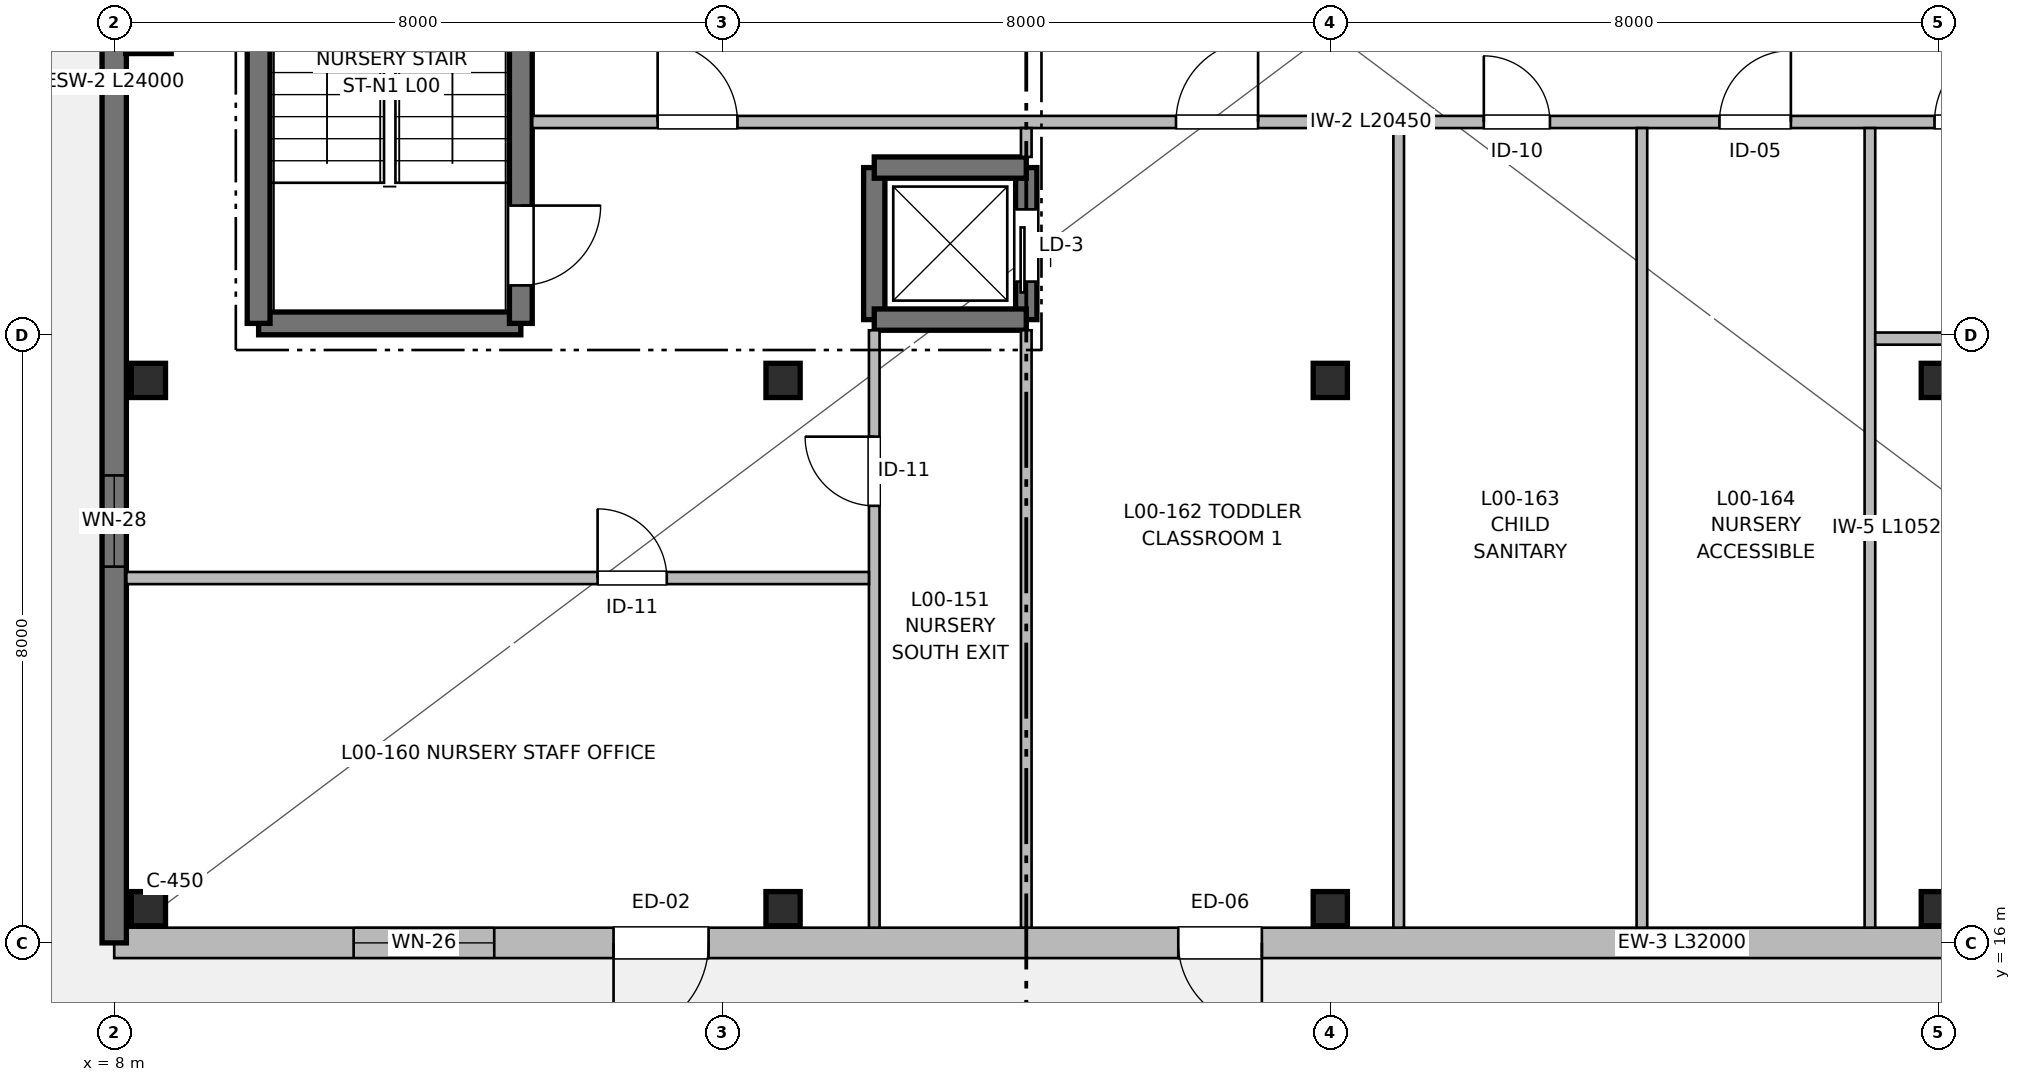
"""IFC4 building model, lengths in metres.
Left out: names, types, materials, properties, quantities, classifications, styles, units other than length and angle.
Written with IfcOpenShell. Run it as: python <this file> out.ifc"""

import sys

from ifc_helpers import new_model, si_unit, direction, frame, frame_2d, origin, origin_2d, place, context, subcontext, project, spatial, rectangle, extrude, element, fill, save


model = new_model("IFC4")
c1 = context("Model", 3, precision=1e-05, world=origin(), true_north=direction((0.0, 1.0)))
c2 = subcontext(c1, "Body", "Model", "MODEL_VIEW")
j1 = project(units=[si_unit("LENGTHUNIT", "METRE"), si_unit("PLANEANGLEUNIT", "RADIAN")], contexts=[c1])
p1 = place(None, origin())
s1 = spatial("IfcSite", under=j1, at=p1, CompositionType="ELEMENT")
p2 = place(p1, origin())
s2 = spatial("IfcBuilding", under=s1, at=p2, CompositionType="ELEMENT")
p3 = place(p2, origin())
s3 = spatial("IfcBuildingStorey", under=s2, at=p3, CompositionType="ELEMENT", Elevation=0.0)
for number, where, z_axis, x_axis in (
    (1, (8.45, 16.45, 0.0), (0.0, 0.0, 1.0), (1.0, 0.0, 0.0)),
    (2, (8.45, 23.4, 0.0), (0.0, 0.0, 1.0), (1.0, 0.0, 0.0)),
):
    element("IfcColumn", number, at=place(p3, frame(where, z_axis=z_axis, x_axis=x_axis)), inside=s3, PredefinedType="COLUMN", context=c2, shape_type="SweptSolid", body=[
        extrude(rectangle(XDim=0.45, YDim=0.45, at=origin_2d()), origin(), (0.0, 0.0, 1.0), 4.16),
    ])
p4 = place(p3, frame((8.45, 28.0, 0.0), z_axis=(0.0, 0.0, 1.0), x_axis=(1.0, 0.0, 0.0)))
e3 = element("IfcColumn", 3, at=p4, inside=s3, PredefinedType="COLUMN", context=c2, shape_type="SweptSolid", body=[
    extrude(rectangle(XDim=0.6, YDim=0.6, at=origin_2d()), origin(), (0.0, 0.0, 1.0), 4.16),
])
for number, where, z_axis, x_axis in (
    (4, (16.8, 16.45, 0.0), (0.0, 0.0, 1.0), (1.0, 0.0, 0.0)),
    (5, (16.8, 23.4, 0.0), (0.0, 0.0, 1.0), (1.0, 0.0, 0.0)),
    (6, (24.0, 16.45, 0.0), (0.0, 0.0, 1.0), (1.0, 0.0, 0.0)),
    (7, (24.0, 23.4, 0.0), (0.0, 0.0, 1.0), (1.0, 0.0, 0.0)),
    (8, (32.0, 16.45, 0.0), (0.0, 0.0, 1.0), (1.0, 0.0, 0.0)),
    (9, (32.0, 23.4, 0.0), (0.0, 0.0, 1.0), (1.0, 0.0, 0.0)),
):
    element("IfcColumn", number, at=place(p3, frame(where, z_axis=z_axis, x_axis=x_axis)), inside=s3, PredefinedType="COLUMN", context=c2, shape_type="SweptSolid", body=[
        extrude(rectangle(XDim=0.45, YDim=0.45, at=origin_2d()), origin(), (0.0, 0.0, 1.0), 4.16),
    ])
p5 = place(p3, frame((40.0, 16.0, 0.0), z_axis=(0.0, 0.0, 1.0), x_axis=(-1.0, 0.0, 0.0)))
e10 = element("IfcWall", 10, at=p5, inside=s3, PredefinedType="SOLIDWALL", context=c2, shape_type="SweptSolid", body=[
    extrude(rectangle(XDim=32.0, YDim=0.4, at=frame_2d((16.0, 0.0))), origin(), (0.0, 0.0, 1.0), 3.9),
])
p6 = place(p5, frame((16.9, 0.0, 0.0)))
e11 = element("IfcOpeningElement", 11, at=p6, cuts=e10, PredefinedType="OPENING", context=c2, shape_type="SweptSolid", body=[
    extrude(rectangle(XDim=1.1, YDim=2.2, at=frame_2d((0.55, 1.1))), frame((0.0, 0.21, 0.0), z_axis=(0.0, -1.0, 0.0), x_axis=(1.0, 0.0, 0.0)), (0.0, 0.0, 1.0), 0.42),
])
p7 = place(p5, frame((24.18, 0.0, 0.0)))
e12 = element("IfcOpeningElement", 12, at=p7, cuts=e10, PredefinedType="OPENING", context=c2, shape_type="SweptSolid", body=[
    extrude(rectangle(XDim=1.25, YDim=2.2, at=frame_2d((0.625, 1.1))), frame((0.0, 0.21, 0.0), z_axis=(0.0, -1.0, 0.0), x_axis=(1.0, 0.0, 0.0)), (0.0, 0.0, 1.0), 0.42),
])
p8 = place(p5, frame((4.0, 0.0, 0.75)))
e13 = element("IfcOpeningElement", 13, at=p8, cuts=e10, PredefinedType="OPENING", context=c2, shape_type="SweptSolid", body=[
    extrude(rectangle(XDim=1.85, YDim=1.6, at=frame_2d((0.925, 0.8))), frame((0.0, 0.21, 0.0), z_axis=(0.0, -1.0, 0.0), x_axis=(1.0, 0.0, 0.0)), (0.0, 0.0, 1.0), 0.42),
])
p9 = place(p5, frame((27.0, 0.0, 0.75)))
e14 = element("IfcOpeningElement", 14, at=p9, cuts=e10, PredefinedType="OPENING", context=c2, shape_type="SweptSolid", body=[
    extrude(rectangle(XDim=1.85, YDim=1.6, at=frame_2d((0.925, 0.8))), frame((0.0, 0.21, 0.0), z_axis=(0.0, -1.0, 0.0), x_axis=(1.0, 0.0, 0.0)), (0.0, 0.0, 1.0), 0.42),
])
p10 = place(p3, frame((8.0, 16.0, 0.0), z_axis=(0.0, 0.0, 1.0), x_axis=(0.0, 1.0, 0.0)))
e15 = element("IfcWall", 15, at=p10, inside=s3, PredefinedType="SHEAR", context=c2, shape_type="SweptSolid", body=[
    extrude(rectangle(XDim=24.0, YDim=0.32, at=frame_2d((12.0, 0.0))), origin(), (0.0, 0.0, 1.0), 3.9),
])
p11 = place(p10, frame((4.95, 0.0, 0.95)))
e16 = element("IfcOpeningElement", 16, at=p11, cuts=e15, PredefinedType="OPENING", context=c2, shape_type="SweptSolid", body=[
    extrude(rectangle(XDim=1.2, YDim=1.3, at=frame_2d((0.6, 0.65))), frame((0.0, 0.17, 0.0), z_axis=(0.0, -1.0, 0.0), x_axis=(1.0, 0.0, 0.0)), (0.0, 0.0, 1.0), 0.34),
])
p12 = place(p10, frame((16.5, 0.0, 0.95)))
e17 = element("IfcOpeningElement", 17, at=p12, cuts=e15, PredefinedType="OPENING", context=c2, shape_type="SweptSolid", body=[
    extrude(rectangle(XDim=1.2, YDim=1.3, at=frame_2d((0.6, 0.65))), frame((0.0, 0.17, 0.0), z_axis=(0.0, -1.0, 0.0), x_axis=(1.0, 0.0, 0.0)), (0.0, 0.0, 1.0), 0.34),
])
p13 = place(p3, frame((9.9, 24.15, 0.0), z_axis=(0.0, 0.0, 1.0), x_axis=(1.0, 0.0, 0.0)))
e18 = element("IfcWall", 18, at=p13, inside=s3, PredefinedType="SHEAR", context=c2, shape_type="SweptSolid", body=[
    extrude(rectangle(XDim=3.45, YDim=0.3, at=frame_2d((1.725, 0.0))), origin(), (0.0, 0.0, 1.0), 4.16),
])
p14 = place(p3, frame((13.35, 31.05, 0.0), z_axis=(0.0, 0.0, 1.0), x_axis=(0.0, -1.0, 0.0)))
e19 = element("IfcWall", 19, at=p14, inside=s3, PredefinedType="SHEAR", context=c2, shape_type="SweptSolid", body=[
    extrude(rectangle(XDim=6.9, YDim=0.3, at=frame_2d((3.45, 0.0))), origin(), (0.0, 0.0, 1.0), 4.16),
])
p15 = place(p14, frame((5.35, 0.0, 0.0)))
e20 = element("IfcOpeningElement", 20, at=p15, cuts=e19, PredefinedType="OPENING", context=c2, shape_type="SweptSolid", body=[
    extrude(rectangle(XDim=1.05, YDim=2.15, at=frame_2d((0.525, 1.075))), frame((0.0, 0.16, 0.0), z_axis=(0.0, -1.0, 0.0), x_axis=(1.0, 0.0, 0.0)), (0.0, 0.0, 1.0), 0.32),
])
p16 = place(p3, frame((9.9, 24.15, 0.0), z_axis=(0.0, 0.0, 1.0), x_axis=(0.0, 1.0, 0.0)))
e21 = element("IfcWall", 21, at=p16, inside=s3, PredefinedType="SHEAR", context=c2, shape_type="SweptSolid", body=[
    extrude(rectangle(XDim=6.9, YDim=0.3, at=frame_2d((3.45, 0.0))), origin(), (0.0, 0.0, 1.0), 4.16),
])
p17 = place(p3, frame((20.0, 24.2, 0.0), z_axis=(0.0, 0.0, 1.0), x_axis=(0.0, 1.0, 0.0)))
e22 = element("IfcWall", 22, at=p17, inside=s3, PredefinedType="SHEAR", context=c2, shape_type="SweptSolid", body=[
    extrude(rectangle(XDim=2.0, YDim=0.28, at=frame_2d((1.0, 0.0))), origin(), (0.0, 0.0, 1.0), 3.9),
])
p18 = place(p17, frame((0.5, 0.0, 0.0)))
e23 = element("IfcOpeningElement", 23, at=p18, cuts=e22, PredefinedType="OPENING", context=c2, shape_type="SweptSolid", body=[
    extrude(rectangle(XDim=0.95, YDim=2.15, at=frame_2d((0.475, 1.075))), frame((0.0, 0.15, 0.0), z_axis=(0.0, -1.0, 0.0), x_axis=(1.0, 0.0, 0.0)), (0.0, 0.0, 1.0), 0.3),
])
for number, where, z_axis, x_axis in (
    (24, (18.0, 24.2, 0.0), (0.0, 0.0, 1.0), (0.0, 1.0, 0.0)),
    (25, (18.0, 24.2, 0.0), (0.0, 0.0, 1.0), (1.0, 0.0, 0.0)),
    (26, (18.0, 26.2, 0.0), (0.0, 0.0, 1.0), (1.0, 0.0, 0.0)),
):
    element("IfcWall", number, at=place(p3, frame(where, z_axis=z_axis, x_axis=x_axis)), inside=s3, PredefinedType="SHEAR", context=c2, shape_type="SweptSolid", body=[
        extrude(rectangle(XDim=2.0, YDim=0.28, at=frame_2d((1.0, 0.0))), origin(), (0.0, 0.0, 1.0), 3.9),
    ])
p19 = place(p3, frame((13.5, 26.8, 0.0), z_axis=(0.0, 0.0, 1.0), x_axis=(1.0, 0.0, 0.0)))
e27 = element("IfcWall", 27, at=p19, inside=s3, PredefinedType="PARTITIONING", context=c2, shape_type="SweptSolid", body=[
    extrude(rectangle(XDim=20.45, YDim=0.16, at=frame_2d((10.225, 0.0))), origin(), (0.0, 0.0, 1.0), 3.89),
])
p20 = place(p19, frame((1.65, 0.0, 0.0)))
e28 = element("IfcOpeningElement", 28, at=p20, cuts=e27, PredefinedType="OPENING", context=c2, shape_type="SweptSolid", body=[
    extrude(rectangle(XDim=1.05, YDim=2.15, at=frame_2d((0.525, 1.075))), frame((0.0, 0.09, 0.0), z_axis=(0.0, -1.0, 0.0), x_axis=(1.0, 0.0, 0.0)), (0.0, 0.0, 1.0), 0.18),
])
p21 = place(p19, frame((18.45, 0.0, 0.0)))
e29 = element("IfcOpeningElement", 29, at=p21, cuts=e27, PredefinedType="OPENING", context=c2, shape_type="SweptSolid", body=[
    extrude(rectangle(XDim=1.05, YDim=2.15, at=frame_2d((0.525, 1.075))), frame((0.0, 0.09, 0.0), z_axis=(0.0, -1.0, 0.0), x_axis=(1.0, 0.0, 0.0)), (0.0, 0.0, 1.0), 0.18),
])
p22 = place(p19, frame((8.47, 0.0, 0.0)))
e30 = element("IfcOpeningElement", 30, at=p22, cuts=e27, PredefinedType="OPENING", context=c2, shape_type="SweptSolid", body=[
    extrude(rectangle(XDim=1.08, YDim=2.15, at=frame_2d((0.54, 1.075))), frame((0.0, 0.09, 0.0), z_axis=(0.0, -1.0, 0.0), x_axis=(1.0, 0.0, 0.0)), (0.0, 0.0, 1.0), 0.18),
])
p23 = place(p19, frame((12.52, 0.0, 0.0)))
e31 = element("IfcOpeningElement", 31, at=p23, cuts=e27, PredefinedType="OPENING", context=c2, shape_type="SweptSolid", body=[
    extrude(rectangle(XDim=0.87, YDim=2.05, at=frame_2d((0.435, 1.025))), frame((0.0, 0.09, 0.0), z_axis=(0.0, -1.0, 0.0), x_axis=(1.0, 0.0, 0.0)), (0.0, 0.0, 1.0), 0.18),
])
p24 = place(p19, frame((15.62, 0.0, 0.0)))
e32 = element("IfcOpeningElement", 32, at=p24, cuts=e27, PredefinedType="OPENING", context=c2, shape_type="SweptSolid", body=[
    extrude(rectangle(XDim=0.94, YDim=2.1, at=frame_2d((0.47, 1.05))), frame((0.0, 0.09, 0.0), z_axis=(0.0, -1.0, 0.0), x_axis=(1.0, 0.0, 0.0)), (0.0, 0.0, 1.0), 0.18),
])
p25 = place(p3, frame((18.0, 16.2, 0.0), z_axis=(0.0, 0.0, 1.0), x_axis=(0.0, 1.0, 0.0)))
e33 = element("IfcWall", 33, at=p25, inside=s3, PredefinedType="PARTITIONING", context=c2, shape_type="SweptSolid", body=[
    extrude(rectangle(XDim=7.86, YDim=0.14, at=frame_2d((3.93, 0.0))), origin(), (0.0, 0.0, 1.0), 3.89),
])
p26 = place(p25, frame((5.55, 0.0, 0.0)))
e34 = element("IfcOpeningElement", 34, at=p26, cuts=e33, PredefinedType="OPENING", context=c2, shape_type="SweptSolid", body=[
    extrude(rectangle(XDim=0.91, YDim=2.1, at=frame_2d((0.455, 1.05))), frame((0.0, 0.08, 0.0), z_axis=(0.0, -1.0, 0.0), x_axis=(1.0, 0.0, 0.0)), (0.0, 0.0, 1.0), 0.16),
])
p27 = place(p3, frame((20.0, 16.2, 0.0), z_axis=(0.0, 0.0, 1.0), x_axis=(0.0, 1.0, 0.0)))
e35 = element("IfcWall", 35, at=p27, inside=s3, PredefinedType="PARTITIONING", context=c2, shape_type="SweptSolid", body=[
    extrude(rectangle(XDim=7.86, YDim=0.14, at=frame_2d((3.93, 0.0))), origin(), (0.0, 0.0, 1.0), 3.89),
])
p28 = place(p3, frame((20.0, 26.34, 0.0), z_axis=(0.0, 0.0, 1.0), x_axis=(0.0, 1.0, 0.0)))
e36 = element("IfcWall", 36, at=p28, inside=s3, PredefinedType="PARTITIONING", context=c2, shape_type="SweptSolid", body=[
    extrude(rectangle(XDim=0.38, YDim=0.14, at=frame_2d((0.19, 0.0))), origin(), (0.0, 0.0, 1.0), 3.89),
])
p29 = place(p3, frame((31.1, 16.2, 0.0), z_axis=(0.0, 0.0, 1.0), x_axis=(0.0, 1.0, 0.0)))
e37 = element("IfcWall", 37, at=p29, inside=s3, PredefinedType="PARTITIONING", context=c2, shape_type="SweptSolid", body=[
    extrude(rectangle(XDim=10.52, YDim=0.14, at=frame_2d((5.26, 0.0))), origin(), (0.0, 0.0, 1.0), 3.89),
])
p30 = place(p3, frame((8.16, 20.8, 0.0), z_axis=(0.0, 0.0, 1.0), x_axis=(1.0, 0.0, 0.0)))
e38 = element("IfcWall", 38, at=p30, inside=s3, PredefinedType="PARTITIONING", context=c2, shape_type="SweptSolid", body=[
    extrude(rectangle(XDim=9.77, YDim=0.16, at=frame_2d((4.885, 0.0))), origin(), (0.0, 0.0, 1.0), 3.89),
])
p31 = place(p30, frame((6.2, 0.0, 0.0)))
e39 = element("IfcOpeningElement", 39, at=p31, cuts=e38, PredefinedType="OPENING", context=c2, shape_type="SweptSolid", body=[
    extrude(rectangle(XDim=0.91, YDim=2.1, at=frame_2d((0.455, 1.05))), frame((0.0, 0.09, 0.0), z_axis=(0.0, -1.0, 0.0), x_axis=(1.0, 0.0, 0.0)), (0.0, 0.0, 1.0), 0.18),
])
p32 = place(p3, frame((31.17, 23.95, 0.0), z_axis=(0.0, 0.0, 1.0), x_axis=(1.0, 0.0, 0.0)))
e40 = element("IfcWall", 40, at=p32, inside=s3, PredefinedType="PARTITIONING", context=c2, shape_type="SweptSolid", body=[
    extrude(rectangle(XDim=8.67, YDim=0.16, at=frame_2d((4.335, 0.0))), origin(), (0.0, 0.0, 1.0), 3.89),
])
p33 = place(p32, frame((1.5, 0.0, 0.0)))
e41 = element("IfcOpeningElement", 41, at=p33, cuts=e40, PredefinedType="OPENING", context=c2, shape_type="SweptSolid", body=[
    extrude(rectangle(XDim=0.85, YDim=2.05, at=frame_2d((0.425, 1.025))), frame((0.0, 0.09, 0.0), z_axis=(0.0, -1.0, 0.0), x_axis=(1.0, 0.0, 0.0)), (0.0, 0.0, 1.0), 0.18),
])
for number, where, z_axis, x_axis in (
    (42, (24.9, 16.2, 0.0), (0.0, 0.0, 1.0), (0.0, 1.0, 0.0)),
    (43, (28.1, 16.2, 0.0), (0.0, 0.0, 1.0), (0.0, 1.0, 0.0)),
):
    element("IfcWall", number, at=place(p3, frame(where, z_axis=z_axis, x_axis=x_axis)), inside=s3, PredefinedType="PARTITIONING", context=c2, shape_type="SweptSolid", body=[
        extrude(rectangle(XDim=10.52, YDim=0.14, at=frame_2d((5.26, 0.0))), origin(), (0.0, 0.0, 1.0), 3.89),
    ])
p34 = place(p6, origin())
e44 = element("IfcDoor", 44, at=p34, inside=s3, OperationType="SINGLE_SWING_LEFT", PredefinedType="DOOR", context=c2, shape_type="SweptSolid", body=[
    extrude(rectangle(XDim=1.1, YDim=2.2, at=frame_2d((0.55, 1.1))), frame((0.0, 0.025, 0.0), z_axis=(0.0, -1.0, 0.0), x_axis=(1.0, 0.0, 0.0)), (0.0, 0.0, 1.0), 0.05),
])
fill(e11, e44)
p35 = place(p7, origin())
e45 = element("IfcDoor", 45, at=p35, inside=s3, OperationType="SINGLE_SWING_RIGHT", PredefinedType="DOOR", context=c2, shape_type="SweptSolid", body=[
    extrude(rectangle(XDim=1.25, YDim=2.2, at=frame_2d((0.625, 1.1))), frame((0.0, 0.025, 0.0), z_axis=(0.0, -1.0, 0.0), x_axis=(1.0, 0.0, 0.0)), (0.0, 0.0, 1.0), 0.05),
])
fill(e12, e45)
p36 = place(p9, origin())
e46 = element("IfcWindow", 46, at=p36, inside=s3, PartitioningType="SINGLE_PANEL", PredefinedType="WINDOW", context=c2, shape_type="SweptSolid", body=[
    extrude(rectangle(XDim=1.85, YDim=1.6, at=frame_2d((0.925, 0.8))), frame((0.0, 0.03, 0.0), z_axis=(0.0, -1.0, 0.0), x_axis=(1.0, 0.0, 0.0)), (0.0, 0.0, 1.0), 0.06),
])
fill(e14, e46)
p37 = place(p11, origin())
e47 = element("IfcWindow", 47, at=p37, inside=s3, PartitioningType="SINGLE_PANEL", PredefinedType="WINDOW", context=c2, shape_type="SweptSolid", body=[
    extrude(rectangle(XDim=1.2, YDim=1.3, at=frame_2d((0.6, 0.65))), frame((0.0, 0.03, 0.0), z_axis=(0.0, -1.0, 0.0), x_axis=(1.0, 0.0, 0.0)), (0.0, 0.0, 1.0), 0.06),
])
fill(e16, e47)
p38 = place(p15, origin())
e48 = element("IfcDoor", 48, at=p38, inside=s3, OperationType="SINGLE_SWING_LEFT", PredefinedType="DOOR", context=c2, shape_type="SweptSolid", body=[
    extrude(rectangle(XDim=1.05, YDim=2.15, at=frame_2d((0.525, 1.075))), frame((0.0, 0.025, 0.0), z_axis=(0.0, -1.0, 0.0), x_axis=(1.0, 0.0, 0.0)), (0.0, 0.0, 1.0), 0.05),
])
fill(e20, e48)
p39 = place(p18, origin())
e49 = element("IfcDoor", 49, at=p39, inside=s3, OperationType="SLIDING_TO_LEFT", PredefinedType="DOOR", context=c2, shape_type="SweptSolid", body=[
    extrude(rectangle(XDim=0.95, YDim=2.15, at=frame_2d((0.475, 1.075))), frame((0.0, 0.025, 0.0), z_axis=(0.0, -1.0, 0.0), x_axis=(1.0, 0.0, 0.0)), (0.0, 0.0, 1.0), 0.05),
])
fill(e23, e49)
p40 = place(p20, origin())
e50 = element("IfcDoor", 50, at=p40, inside=s3, OperationType="SINGLE_SWING_LEFT", PredefinedType="DOOR", context=c2, shape_type="SweptSolid", body=[
    extrude(rectangle(XDim=1.05, YDim=2.15, at=frame_2d((0.525, 1.075))), frame((0.0, 0.025, 0.0), z_axis=(0.0, -1.0, 0.0), x_axis=(1.0, 0.0, 0.0)), (0.0, 0.0, 1.0), 0.05),
])
fill(e28, e50)
p41 = place(p21, origin())
e51 = element("IfcDoor", 51, at=p41, inside=s3, OperationType="SINGLE_SWING_RIGHT", PredefinedType="DOOR", context=c2, shape_type="SweptSolid", body=[
    extrude(rectangle(XDim=1.05, YDim=2.15, at=frame_2d((0.525, 1.075))), frame((0.0, 0.025, 0.0), z_axis=(0.0, -1.0, 0.0), x_axis=(1.0, 0.0, 0.0)), (0.0, 0.0, 1.0), 0.05),
])
fill(e29, e51)
p42 = place(p31, origin())
e52 = element("IfcDoor", 52, at=p42, inside=s3, OperationType="SINGLE_SWING_LEFT", PredefinedType="DOOR", context=c2, shape_type="SweptSolid", body=[
    extrude(rectangle(XDim=0.91, YDim=2.1, at=frame_2d((0.455, 1.05))), frame((0.0, 0.025, 0.0), z_axis=(0.0, -1.0, 0.0), x_axis=(1.0, 0.0, 0.0)), (0.0, 0.0, 1.0), 0.05),
])
fill(e39, e52)
p43 = place(p26, origin())
e53 = element("IfcDoor", 53, at=p43, inside=s3, OperationType="SINGLE_SWING_RIGHT", PredefinedType="DOOR", context=c2, shape_type="SweptSolid", body=[
    extrude(rectangle(XDim=0.91, YDim=2.1, at=frame_2d((0.455, 1.05))), frame((0.0, 0.025, 0.0), z_axis=(0.0, -1.0, 0.0), x_axis=(1.0, 0.0, 0.0)), (0.0, 0.0, 1.0), 0.05),
])
fill(e34, e53)
p44 = place(p22, origin())
e54 = element("IfcDoor", 54, at=p44, inside=s3, OperationType="SINGLE_SWING_RIGHT", PredefinedType="DOOR", context=c2, shape_type="SweptSolid", body=[
    extrude(rectangle(XDim=1.08, YDim=2.15, at=frame_2d((0.54, 1.075))), frame((0.0, 0.025, 0.0), z_axis=(0.0, -1.0, 0.0), x_axis=(1.0, 0.0, 0.0)), (0.0, 0.0, 1.0), 0.05),
])
fill(e30, e54)
p45 = place(p23, origin())
e55 = element("IfcDoor", 55, at=p45, inside=s3, OperationType="SINGLE_SWING_LEFT", PredefinedType="DOOR", context=c2, shape_type="SweptSolid", body=[
    extrude(rectangle(XDim=0.87, YDim=2.05, at=frame_2d((0.435, 1.025))), frame((0.0, 0.025, 0.0), z_axis=(0.0, -1.0, 0.0), x_axis=(1.0, 0.0, 0.0)), (0.0, 0.0, 1.0), 0.05),
])
fill(e31, e55)
p46 = place(p24, origin())
e56 = element("IfcDoor", 56, at=p46, inside=s3, OperationType="SINGLE_SWING_RIGHT", PredefinedType="DOOR", context=c2, shape_type="SweptSolid", body=[
    extrude(rectangle(XDim=0.94, YDim=2.1, at=frame_2d((0.47, 1.05))), frame((0.0, 0.025, 0.0), z_axis=(0.0, -1.0, 0.0), x_axis=(1.0, 0.0, 0.0)), (0.0, 0.0, 1.0), 0.05),
])
fill(e32, e56)
save(model, sys.argv[1])
